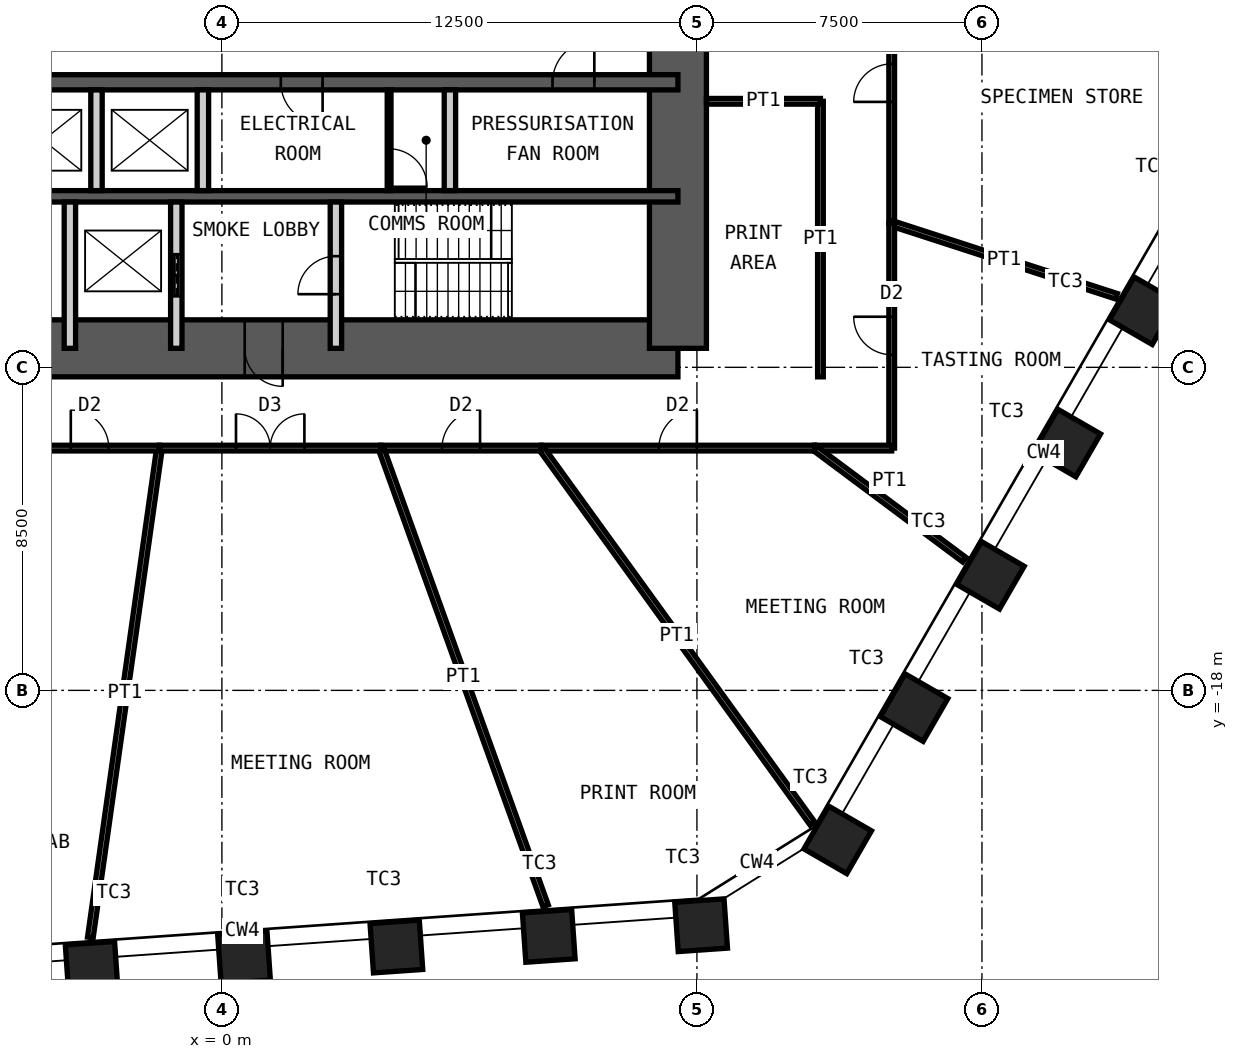
"""IFC4 building model, lengths in metres.
Left out: names, types, materials, properties, quantities, classifications, styles, units other than length and angle.
Written with IfcOpenShell. Run it as: python <this file> out.ifc"""

import sys

from ifc_helpers import new_model, si_unit, direction, frame, frame_2d, origin, origin_2d, place, context, subcontext, project, spatial, rectangle, hollow_rectangle, extrude, element, fill, save


model = new_model("IFC4")
c1 = context("Model", 3, precision=1e-05, world=origin(), true_north=direction((0.0, 1.0)))
c2 = subcontext(c1, "Body", "Model", "MODEL_VIEW")
j1 = project(units=[si_unit("LENGTHUNIT", "METRE"), si_unit("PLANEANGLEUNIT", "RADIAN")], contexts=[c1])
p1 = place(None, origin())
s1 = spatial("IfcSite", under=j1, at=p1, CompositionType="ELEMENT")
p2 = place(p1, origin())
s2 = spatial("IfcBuilding", under=s1, at=p2, CompositionType="ELEMENT")
p3 = place(p2, frame((0.0, 0.0, 128.2)))
s3 = spatial("IfcBuildingStorey", under=s2, at=p3, CompositionType="ELEMENT", Elevation=128.2)
for number, where, z_axis, x_axis in (
    (1, (24.242, -8.011, 0.0), (0.0, 0.0, 1.0), (0.5, 0.866, 0.0)),
    (2, (22.233, -11.491, 0.0), (0.0, 0.0, 1.0), (0.5, 0.866, 0.0)),
    (3, (20.223, -14.972, 0.0), (0.0, 0.0, 1.0), (0.5, 0.866, 0.0)),
    (4, (18.214, -18.453, 0.0), (0.0, 0.0, 1.0), (0.5, 0.866, 0.0)),
    (5, (16.204, -21.933, 0.0), (0.0, 0.0, 1.0), (0.5, 0.866, 0.0)),
    (6, (12.61, -24.179, 0.0), (0.0, 0.0, 1.0), (0.998, 0.07, 0.0)),
    (7, (8.601, -24.46, 0.0), (0.0, 0.0, 1.0), (0.998, 0.07, 0.0)),
    (8, (4.592, -24.74, 0.0), (0.0, 0.0, 1.0), (0.998, 0.07, 0.0)),
    (9, (0.582, -25.02, 0.0), (0.0, 0.0, 1.0), (0.998, 0.07, 0.0)),
    (10, (-3.427, -25.301, 0.0), (0.0, 0.0, 1.0), (0.998, 0.07, 0.0)),
):
    element("IfcColumn", number, at=place(p3, frame(where, z_axis=z_axis, x_axis=x_axis)), inside=s3, PredefinedType="COLUMN", context=c2, shape_type="SweptSolid", body=[
        extrude(hollow_rectangle(XDim=1.3, YDim=1.3, WallThickness=0.1, at=origin_2d()), origin(), (0.0, 0.0, 1.0), 4.2),
    ])
p4 = place(p3, frame((-12.0, -9.0, 0.0), z_axis=(0.0, 0.0, 1.0), x_axis=(1.0, 0.0, 0.0)))
e11 = element("IfcWall", 11, at=p4, inside=s3, PredefinedType="SHEAR", context=c2, shape_type="SweptSolid", body=[
    extrude(rectangle(XDim=24.0, YDim=1.5, at=frame_2d((12.0, 0.0))), origin(), (0.0, 0.0, 1.0), 4.2),
])
p5 = place(p4, frame((1.35, 0.0, 0.0)))
e12 = element("IfcOpeningElement", 12, at=p5, cuts=e11, PredefinedType="OPENING", context=c2, shape_type="SweptSolid", body=[
    extrude(rectangle(XDim=1.0, YDim=2.1, at=frame_2d((0.5, 1.05))), frame((0.0, 0.76, 0.0), z_axis=(0.0, -1.0, 0.0), x_axis=(1.0, 0.0, 0.0)), (0.0, 0.0, 1.0), 1.52),
])
p6 = place(p4, frame((5.325, 0.0, 0.0)))
e13 = element("IfcOpeningElement", 13, at=p6, cuts=e11, PredefinedType="OPENING", context=c2, shape_type="SweptSolid", body=[
    extrude(rectangle(XDim=1.15, YDim=2.1, at=frame_2d((0.575, 1.05))), frame((0.0, 0.76, 0.0), z_axis=(0.0, -1.0, 0.0), x_axis=(1.0, 0.0, 0.0)), (0.0, 0.0, 1.0), 1.52),
])
p7 = place(p4, frame((12.6, 0.0, 0.0)))
e14 = element("IfcOpeningElement", 14, at=p7, cuts=e11, PredefinedType="OPENING", context=c2, shape_type="SweptSolid", body=[
    extrude(rectangle(XDim=1.0, YDim=2.1, at=frame_2d((0.5, 1.05))), frame((0.0, 0.76, 0.0), z_axis=(0.0, -1.0, 0.0), x_axis=(1.0, 0.0, 0.0)), (0.0, 0.0, 1.0), 1.52),
])
p8 = place(p3, frame((12.0, -9.0, 0.0), z_axis=(0.0, 0.0, 1.0), x_axis=(0.0, 1.0, 0.0)))
e15 = element("IfcWall", 15, at=p8, inside=s3, PredefinedType="SHEAR", context=c2, shape_type="SweptSolid", body=[
    extrude(rectangle(XDim=18.0, YDim=1.5, at=frame_2d((9.0, 0.0))), origin(), (0.0, 0.0, 1.0), 4.2),
])
p9 = place(p8, frame((8.1, 0.0, 0.0)))
e16 = element("IfcOpeningElement", 16, at=p9, cuts=e15, PredefinedType="OPENING", context=c2, shape_type="SweptSolid", body=[
    extrude(rectangle(XDim=1.8, YDim=2.1, at=frame_2d((0.9, 1.05))), frame((0.0, 0.76, 0.0), z_axis=(0.0, -1.0, 0.0), x_axis=(1.0, 0.0, 0.0)), (0.0, 0.0, 1.0), 1.52),
])
p10 = place(p3, frame((-12.0, -2.0, 0.0), z_axis=(0.0, 0.0, 1.0), x_axis=(1.0, 0.0, 0.0)))
e17 = element("IfcWall", 17, at=p10, inside=s3, PredefinedType="SHEAR", context=c2, shape_type="SweptSolid", body=[
    extrude(rectangle(XDim=24.0, YDim=0.4, at=frame_2d((12.0, 0.0))), origin(), (0.0, 0.0, 1.0), 4.2),
])
p11 = place(p10, frame((1.1, 0.0, 0.0)))
e18 = element("IfcOpeningElement", 18, at=p11, cuts=e17, PredefinedType="OPENING", context=c2, shape_type="SweptSolid", body=[
    extrude(rectangle(XDim=1.1, YDim=2.1, at=frame_2d((0.55, 1.05))), frame((0.0, 0.21, 0.0), z_axis=(0.0, -1.0, 0.0), x_axis=(1.0, 0.0, 0.0)), (0.0, 0.0, 1.0), 0.42),
])
p12 = place(p10, frame((13.55, 0.0, 0.0)))
e19 = element("IfcOpeningElement", 19, at=p12, cuts=e17, PredefinedType="OPENING", context=c2, shape_type="SweptSolid", body=[
    extrude(rectangle(XDim=1.1, YDim=2.1, at=frame_2d((0.55, 1.05))), frame((0.0, 0.21, 0.0), z_axis=(0.0, -1.0, 0.0), x_axis=(1.0, 0.0, 0.0)), (0.0, 0.0, 1.0), 0.42),
])
p13 = place(p10, frame((20.7, 0.0, 0.0)))
e20 = element("IfcOpeningElement", 20, at=p13, cuts=e17, PredefinedType="OPENING", context=c2, shape_type="SweptSolid", body=[
    extrude(rectangle(XDim=1.1, YDim=2.1, at=frame_2d((0.55, 1.05))), frame((0.0, 0.21, 0.0), z_axis=(0.0, -1.0, 0.0), x_axis=(1.0, 0.0, 0.0)), (0.0, 0.0, 1.0), 0.42),
])
p14 = place(p10, frame((4.0, 0.0, 0.0)))
e21 = element("IfcOpeningElement", 21, at=p14, cuts=e17, PredefinedType="OPENING", context=c2, shape_type="SweptSolid", body=[
    extrude(rectangle(XDim=1.0, YDim=2.1, at=frame_2d((0.5, 1.05))), frame((0.0, 0.21, 0.0), z_axis=(0.0, -1.0, 0.0), x_axis=(1.0, 0.0, 0.0)), (0.0, 0.0, 1.0), 0.42),
])
p15 = place(p3, frame((-12.0, -5.0, 0.0), z_axis=(0.0, 0.0, 1.0), x_axis=(1.0, 0.0, 0.0)))
e22 = element("IfcWall", 22, at=p15, inside=s3, PredefinedType="SHEAR", context=c2, shape_type="SweptSolid", body=[
    extrude(rectangle(XDim=24.0, YDim=0.3, at=frame_2d((12.0, 0.0))), origin(), (0.0, 0.0, 1.0), 4.2),
])
for number, where, z_axis, x_axis in (
    (23, (-3.3, -4.85, 0.0), (0.0, 0.0, 1.0), (0.0, 1.0, 0.0)),
    (24, (-0.5, -4.85, 0.0), (0.0, 0.0, 1.0), (0.0, 1.0, 0.0)),
    (25, (6.0, -4.85, 0.0), (0.0, 0.0, 1.0), (0.0, 1.0, 0.0)),
):
    element("IfcWall", number, at=place(p3, frame(where, z_axis=z_axis, x_axis=x_axis)), inside=s3, PredefinedType="PARTITIONING", context=c2, shape_type="SweptSolid", body=[
        extrude(rectangle(XDim=2.65, YDim=0.3, at=frame_2d((1.325, 0.0))), origin(), (0.0, 0.0, 1.0), 3.98),
    ])
p16 = place(p3, frame((-4.0, -9.0, 0.0), z_axis=(0.0, 0.0, 1.0), x_axis=(0.0, 1.0, 0.0)))
e26 = element("IfcWall", 26, at=p16, inside=s3, PredefinedType="PARTITIONING", context=c2, shape_type="SweptSolid", body=[
    extrude(rectangle(XDim=3.85, YDim=0.3, at=frame_2d((1.925, 0.0))), origin(), (0.0, 0.0, 1.0), 3.98),
])
p17 = place(p3, frame((-1.2, -9.0, 0.0), z_axis=(0.0, 0.0, 1.0), x_axis=(0.0, 1.0, 0.0)))
e27 = element("IfcWall", 27, at=p17, inside=s3, PredefinedType="PARTITIONING", context=c2, shape_type="SweptSolid", body=[
    extrude(rectangle(XDim=3.85, YDim=0.3, at=frame_2d((1.925, 0.0))), origin(), (0.0, 0.0, 1.0), 3.98),
])
p18 = place(p17, frame((1.375, 0.0, 0.0)))
e28 = element("IfcOpeningElement", 28, at=p18, cuts=e27, PredefinedType="OPENING", context=c2, shape_type="SweptSolid", body=[
    extrude(rectangle(XDim=1.1, YDim=2.4, at=frame_2d((0.55, 1.2))), frame((0.0, 0.16, 0.0), z_axis=(0.0, -1.0, 0.0), x_axis=(1.0, 0.0, 0.0)), (0.0, 0.0, 1.0), 0.32),
])
p19 = place(p3, frame((3.0, -9.0, 0.0), z_axis=(0.0, 0.0, 1.0), x_axis=(0.0, 1.0, 0.0)))
e29 = element("IfcWall", 29, at=p19, inside=s3, PredefinedType="PARTITIONING", context=c2, shape_type="SweptSolid", body=[
    extrude(rectangle(XDim=3.85, YDim=0.3, at=frame_2d((1.925, 0.0))), origin(), (0.0, 0.0, 1.0), 3.98),
])
p20 = place(p19, frame((1.425, 0.0, 0.0)))
e30 = element("IfcOpeningElement", 30, at=p20, cuts=e29, PredefinedType="OPENING", context=c2, shape_type="SweptSolid", body=[
    extrude(rectangle(XDim=1.0, YDim=2.1, at=frame_2d((0.5, 1.05))), frame((0.0, 0.16, 0.0), z_axis=(0.0, -1.0, 0.0), x_axis=(1.0, 0.0, 0.0)), (0.0, 0.0, 1.0), 0.32),
])
p21 = place(p3, frame((4.4, -4.85, 0.0), z_axis=(0.0, 0.0, 1.0), x_axis=(0.0, 1.0, 0.0)))
e31 = element("IfcWall", 31, at=p21, inside=s3, PredefinedType="PARTITIONING", context=c2, shape_type="SweptSolid", body=[
    extrude(rectangle(XDim=2.65, YDim=0.1, at=frame_2d((1.325, 0.0))), origin(), (0.0, 0.0, 1.0), 3.98),
])
p22 = place(p21, frame((0.1, 0.0, 0.0)))
e32 = element("IfcOpeningElement", 32, at=p22, cuts=e31, PredefinedType="OPENING", context=c2, shape_type="SweptSolid", body=[
    extrude(rectangle(XDim=1.0, YDim=2.4, at=frame_2d((0.5, 1.2))), frame((0.0, 0.06, 0.0), z_axis=(0.0, -1.0, 0.0), x_axis=(1.0, 0.0, 0.0)), (0.0, 0.0, 1.0), 0.12),
])
p23 = place(p3, frame((-3.462, -24.503, 0.0), z_axis=(0.0, 0.0, 1.0), x_axis=(0.139899618934, 0.990165691499, 0.0)))
e33 = element("IfcWall", 33, at=p23, inside=s3, PredefinedType="PARTITIONING", context=c2, shape_type="SweptSolid", body=[
    extrude(rectangle(XDim=13.006, YDim=0.15, at=frame_2d((6.503, 0.0))), origin(), (0.0, 0.0, 1.0), 3.33),
])
p24 = place(p3, frame((-1.642, -11.625, 0.0), z_axis=(0.0, 0.0, 1.0), x_axis=(-1.0, 0.0, 0.0)))
e34 = element("IfcWall", 34, at=p24, inside=s3, PredefinedType="PARTITIONING", context=c2, shape_type="SweptSolid", body=[
    extrude(rectangle(XDim=3.668, YDim=0.15, at=frame_2d((1.834, 0.0))), origin(), (0.0, 0.0, 1.0), 4.03),
])
p25 = place(p24, frame((1.334, 0.0, 0.0)))
e35 = element("IfcOpeningElement", 35, at=p25, cuts=e34, PredefinedType="OPENING", context=c2, shape_type="SweptSolid", body=[
    extrude(rectangle(XDim=1.0, YDim=2.4, at=frame_2d((0.5, 1.2))), frame((0.0, 0.085, 0.0), z_axis=(0.0, -1.0, 0.0), x_axis=(1.0, 0.0, 0.0)), (0.0, 0.0, 1.0), 0.17),
])
p26 = place(p3, frame((17.625, 1.681, 0.0), z_axis=(0.0, 0.0, 1.0), x_axis=(0.0, -1.0, 0.0)))
e36 = element("IfcWall", 36, at=p26, inside=s3, PredefinedType="PARTITIONING", context=c2, shape_type="SweptSolid", body=[
    extrude(rectangle(XDim=7.394, YDim=0.15, at=frame_2d((3.697, 0.0))), origin(), (0.0, 0.0, 1.0), 4.03),
])
p27 = place(p26, frame((3.197, 0.0, 0.0)))
e37 = element("IfcOpeningElement", 37, at=p27, cuts=e36, PredefinedType="OPENING", context=c2, shape_type="SweptSolid", body=[
    extrude(rectangle(XDim=1.0, YDim=2.4, at=frame_2d((0.5, 1.2))), frame((0.0, 0.085, 0.0), z_axis=(0.0, -1.0, 0.0), x_axis=(1.0, 0.0, 0.0)), (0.0, 0.0, 1.0), 0.17),
])
p28 = place(p3, frame((23.541, -7.63, 0.0), z_axis=(0.0, 0.0, 1.0), x_axis=(-0.951280715006, 0.308326128081, 0.0)))
e38 = element("IfcWall", 38, at=p28, inside=s3, PredefinedType="PARTITIONING", context=c2, shape_type="SweptSolid", body=[
    extrude(rectangle(XDim=6.219, YDim=0.15, at=frame_2d((3.109, 0.0))), origin(), (0.0, 0.0, 1.0), 3.33),
])
p29 = place(p3, frame((17.625, -5.713, 0.0), z_axis=(0.0, 0.0, 1.0), x_axis=(0.0, -1.0, 0.0)))
e39 = element("IfcWall", 39, at=p29, inside=s3, PredefinedType="PARTITIONING", context=c2, shape_type="SweptSolid", body=[
    extrude(rectangle(XDim=5.912, YDim=0.15, at=frame_2d((2.956, 0.0))), origin(), (0.0, 0.0, 1.0), 4.03),
])
p30 = place(p29, frame((2.456, 0.0, 0.0)))
e40 = element("IfcOpeningElement", 40, at=p30, cuts=e39, PredefinedType="OPENING", context=c2, shape_type="SweptSolid", body=[
    extrude(rectangle(XDim=1.0, YDim=2.4, at=frame_2d((0.5, 1.2))), frame((0.0, 0.085, 0.0), z_axis=(0.0, -1.0, 0.0), x_axis=(1.0, 0.0, 0.0)), (0.0, 0.0, 1.0), 0.17),
])
p31 = place(p3, frame((17.625, -11.625, 0.0), z_axis=(0.0, 0.0, 1.0), x_axis=(-1.0, 0.0, 0.0)))
e41 = element("IfcWall", 41, at=p31, inside=s3, PredefinedType="PARTITIONING", context=c2, shape_type="SweptSolid", body=[
    extrude(rectangle(XDim=2.029, YDim=0.15, at=frame_2d((1.014, 0.0))), origin(), (0.0, 0.0, 1.0), 4.03),
])
p32 = place(p3, frame((19.537, -14.562, 0.0), z_axis=(0.0, 0.0, 1.0), x_axis=(-0.801778753003, 0.597620976233, 0.0)))
e42 = element("IfcWall", 42, at=p32, inside=s3, PredefinedType="PARTITIONING", context=c2, shape_type="SweptSolid", body=[
    extrude(rectangle(XDim=4.915, YDim=0.15, at=frame_2d((2.458, 0.0))), origin(), (0.0, 0.0, 1.0), 3.33),
])
p33 = place(p3, frame((15.596, -11.625, 0.0), z_axis=(0.0, 0.0, 1.0), x_axis=(-1.0, 0.0, 0.0)))
e43 = element("IfcWall", 43, at=p33, inside=s3, PredefinedType="PARTITIONING", context=c2, shape_type="SweptSolid", body=[
    extrude(rectangle(XDim=7.195, YDim=0.15, at=frame_2d((3.597, 0.0))), origin(), (0.0, 0.0, 1.0), 4.03),
])
p34 = place(p33, frame((3.097, 0.0, 0.0)))
e44 = element("IfcOpeningElement", 44, at=p34, cuts=e43, PredefinedType="OPENING", context=c2, shape_type="SweptSolid", body=[
    extrude(rectangle(XDim=1.0, YDim=2.4, at=frame_2d((0.5, 1.2))), frame((0.0, 0.085, 0.0), z_axis=(0.0, -1.0, 0.0), x_axis=(1.0, 0.0, 0.0)), (0.0, 0.0, 1.0), 0.17),
])
p35 = place(p3, frame((15.54, -21.502, 0.0), z_axis=(0.0, 0.0, 1.0), x_axis=(-0.585731902034, 0.810504866697, 0.0)))
e45 = element("IfcWall", 45, at=p35, inside=s3, PredefinedType="PARTITIONING", context=c2, shape_type="SweptSolid", body=[
    extrude(rectangle(XDim=12.187, YDim=0.15, at=frame_2d((6.093, 0.0))), origin(), (0.0, 0.0, 1.0), 2.93),
])
p36 = place(p3, frame((8.401, -11.625, 0.0), z_axis=(0.0, 0.0, 1.0), x_axis=(-1.0, 0.0, 0.0)))
e46 = element("IfcWall", 46, at=p36, inside=s3, PredefinedType="PARTITIONING", context=c2, shape_type="SweptSolid", body=[
    extrude(rectangle(XDim=4.217, YDim=0.15, at=frame_2d((2.109, 0.0))), origin(), (0.0, 0.0, 1.0), 4.03),
])
p37 = place(p36, frame((1.609, 0.0, 0.0)))
e47 = element("IfcOpeningElement", 47, at=p37, cuts=e46, PredefinedType="OPENING", context=c2, shape_type="SweptSolid", body=[
    extrude(rectangle(XDim=1.0, YDim=2.4, at=frame_2d((0.5, 1.2))), frame((0.0, 0.085, 0.0), z_axis=(0.0, -1.0, 0.0), x_axis=(1.0, 0.0, 0.0)), (0.0, 0.0, 1.0), 0.17),
])
p38 = place(p3, frame((8.518, -23.667, 0.0), z_axis=(0.0, 0.0, 1.0), x_axis=(-0.338635030469, 0.940917805198, 0.0)))
e48 = element("IfcWall", 48, at=p38, inside=s3, PredefinedType="PARTITIONING", context=c2, shape_type="SweptSolid", body=[
    extrude(rectangle(XDim=12.798, YDim=0.15, at=frame_2d((6.399, 0.0))), origin(), (0.0, 0.0, 1.0), 3.33),
])
p39 = place(p3, frame((4.184, -11.625, 0.0), z_axis=(0.0, 0.0, 1.0), x_axis=(-1.0, 0.0, 0.0)))
e49 = element("IfcWall", 49, at=p39, inside=s3, PredefinedType="PARTITIONING", context=c2, shape_type="SweptSolid", body=[
    extrude(rectangle(XDim=5.826, YDim=0.15, at=frame_2d((2.913, 0.0))), origin(), (0.0, 0.0, 1.0), 4.03),
])
p40 = place(p39, frame((2.013, 0.0, 0.0)))
e50 = element("IfcOpeningElement", 50, at=p40, cuts=e49, PredefinedType="OPENING", context=c2, shape_type="SweptSolid", body=[
    extrude(rectangle(XDim=1.8, YDim=2.4, at=frame_2d((0.9, 1.2))), frame((0.0, 0.085, 0.0), z_axis=(0.0, -1.0, 0.0), x_axis=(1.0, 0.0, 0.0)), (0.0, 0.0, 1.0), 0.17),
])
p41 = place(p3, frame((15.75, -9.75, 0.0), z_axis=(0.0, 0.0, 1.0), x_axis=(0.0, 1.0, 0.0)))
e51 = element("IfcWall", 51, at=p41, inside=s3, PredefinedType="PARTITIONING", context=c2, shape_type="SweptSolid", body=[
    extrude(rectangle(XDim=7.25, YDim=0.15, at=frame_2d((3.625, 0.0))), origin(), (0.0, 0.0, 1.0), 4.03),
])
p42 = place(p3, frame((12.75, -2.5, 0.0), z_axis=(0.0, 0.0, 1.0), x_axis=(1.0, 0.0, 0.0)))
e52 = element("IfcWall", 52, at=p42, inside=s3, PredefinedType="PARTITIONING", context=c2, shape_type="SweptSolid", body=[
    extrude(rectangle(XDim=3.0, YDim=0.15, at=frame_2d((1.5, 0.0))), origin(), (0.0, 0.0, 1.0), 3.33),
])
p43 = place(p7, origin())
e53 = element("IfcDoor", 53, at=p43, inside=s3, OperationType="SINGLE_SWING_RIGHT", PredefinedType="DOOR", context=c2, shape_type="SweptSolid", body=[
    extrude(rectangle(XDim=1.0, YDim=2.1, at=frame_2d((0.5, 1.05))), frame((0.0, 0.025, 0.0), z_axis=(0.0, -1.0, 0.0), x_axis=(1.0, 0.0, 0.0)), (0.0, 0.0, 1.0), 0.05),
])
fill(e14, e53)
p44 = place(p20, origin())
e54 = element("IfcDoor", 54, at=p44, inside=s3, OperationType="SINGLE_SWING_RIGHT", PredefinedType="DOOR", context=c2, shape_type="SweptSolid", body=[
    extrude(rectangle(XDim=1.0, YDim=2.1, at=frame_2d((0.5, 1.05))), frame((0.0, 0.025, 0.0), z_axis=(0.0, -1.0, 0.0), x_axis=(1.0, 0.0, 0.0)), (0.0, 0.0, 1.0), 0.05),
])
fill(e30, e54)
p45 = place(p12, origin())
e55 = element("IfcDoor", 55, at=p45, inside=s3, OperationType="SINGLE_SWING_RIGHT", PredefinedType="DOOR", context=c2, shape_type="SweptSolid", body=[
    extrude(rectangle(XDim=1.1, YDim=2.1, at=frame_2d((0.55, 1.05))), frame((0.0, 0.025, 0.0), z_axis=(0.0, -1.0, 0.0), x_axis=(1.0, 0.0, 0.0)), (0.0, 0.0, 1.0), 0.05),
])
fill(e19, e55)
p46 = place(p13, origin())
e56 = element("IfcDoor", 56, at=p46, inside=s3, OperationType="SINGLE_SWING_LEFT", PredefinedType="DOOR", context=c2, shape_type="SweptSolid", body=[
    extrude(rectangle(XDim=1.1, YDim=2.1, at=frame_2d((0.55, 1.05))), frame((0.0, 0.025, 0.0), z_axis=(0.0, -1.0, 0.0), x_axis=(1.0, 0.0, 0.0)), (0.0, 0.0, 1.0), 0.05),
])
fill(e20, e56)
p47 = place(p18, origin())
e57 = element("IfcDoor", 57, at=p47, inside=s3, OperationType="DOUBLE_DOOR_SLIDING", PredefinedType="DOOR", context=c2, shape_type="SweptSolid", body=[
    extrude(rectangle(XDim=1.1, YDim=2.4, at=frame_2d((0.55, 1.2))), frame((0.0, 0.025, 0.0), z_axis=(0.0, -1.0, 0.0), x_axis=(1.0, 0.0, 0.0)), (0.0, 0.0, 1.0), 0.05),
])
fill(e28, e57)
p48 = place(p22, origin())
e58 = element("IfcDoor", 58, at=p48, inside=s3, OperationType="SINGLE_SWING_LEFT", PredefinedType="DOOR", context=c2, shape_type="SweptSolid", body=[
    extrude(rectangle(XDim=1.0, YDim=2.4, at=frame_2d((0.5, 1.2))), frame((0.0, 0.025, 0.0), z_axis=(0.0, -1.0, 0.0), x_axis=(1.0, 0.0, 0.0)), (0.0, 0.0, 1.0), 0.05),
])
fill(e32, e58)
p49 = place(p25, origin())
e59 = element("IfcDoor", 59, at=p49, inside=s3, OperationType="SINGLE_SWING_RIGHT", PredefinedType="DOOR", context=c2, shape_type="SweptSolid", body=[
    extrude(rectangle(XDim=1.0, YDim=2.4, at=frame_2d((0.5, 1.2))), frame((0.0, 0.025, 0.0), z_axis=(0.0, -1.0, 0.0), x_axis=(1.0, 0.0, 0.0)), (0.0, 0.0, 1.0), 0.05),
])
fill(e35, e59)
p50 = place(p27, origin())
e60 = element("IfcDoor", 60, at=p50, inside=s3, OperationType="SINGLE_SWING_RIGHT", PredefinedType="DOOR", context=c2, shape_type="SweptSolid", body=[
    extrude(rectangle(XDim=1.0, YDim=2.4, at=frame_2d((0.5, 1.2))), frame((0.0, 0.025, 0.0), z_axis=(0.0, -1.0, 0.0), x_axis=(1.0, 0.0, 0.0)), (0.0, 0.0, 1.0), 0.05),
])
fill(e37, e60)
p51 = place(p30, origin())
e61 = element("IfcDoor", 61, at=p51, inside=s3, OperationType="SINGLE_SWING_LEFT", PredefinedType="DOOR", context=c2, shape_type="SweptSolid", body=[
    extrude(rectangle(XDim=1.0, YDim=2.4, at=frame_2d((0.5, 1.2))), frame((0.0, 0.025, 0.0), z_axis=(0.0, -1.0, 0.0), x_axis=(1.0, 0.0, 0.0)), (0.0, 0.0, 1.0), 0.05),
])
fill(e40, e61)
p52 = place(p34, origin())
e62 = element("IfcDoor", 62, at=p52, inside=s3, OperationType="SINGLE_SWING_LEFT", PredefinedType="DOOR", context=c2, shape_type="SweptSolid", body=[
    extrude(rectangle(XDim=1.0, YDim=2.4, at=frame_2d((0.5, 1.2))), frame((0.0, 0.025, 0.0), z_axis=(0.0, -1.0, 0.0), x_axis=(1.0, 0.0, 0.0)), (0.0, 0.0, 1.0), 0.05),
])
fill(e44, e62)
p53 = place(p37, origin())
e63 = element("IfcDoor", 63, at=p53, inside=s3, OperationType="SINGLE_SWING_LEFT", PredefinedType="DOOR", context=c2, shape_type="SweptSolid", body=[
    extrude(rectangle(XDim=1.0, YDim=2.4, at=frame_2d((0.5, 1.2))), frame((0.0, 0.025, 0.0), z_axis=(0.0, -1.0, 0.0), x_axis=(1.0, 0.0, 0.0)), (0.0, 0.0, 1.0), 0.05),
])
fill(e47, e63)
p54 = place(p40, origin())
e64 = element("IfcDoor", 64, at=p54, inside=s3, OperationType="DOUBLE_DOOR_DOUBLE_SWING", PredefinedType="DOOR", context=c2, shape_type="SweptSolid", body=[
    extrude(rectangle(XDim=1.8, YDim=2.4, at=frame_2d((0.9, 1.2))), frame((0.0, 0.025, 0.0), z_axis=(0.0, -1.0, 0.0), x_axis=(1.0, 0.0, 0.0)), (0.0, 0.0, 1.0), 0.05),
])
fill(e50, e64)
save(model, sys.argv[1])
